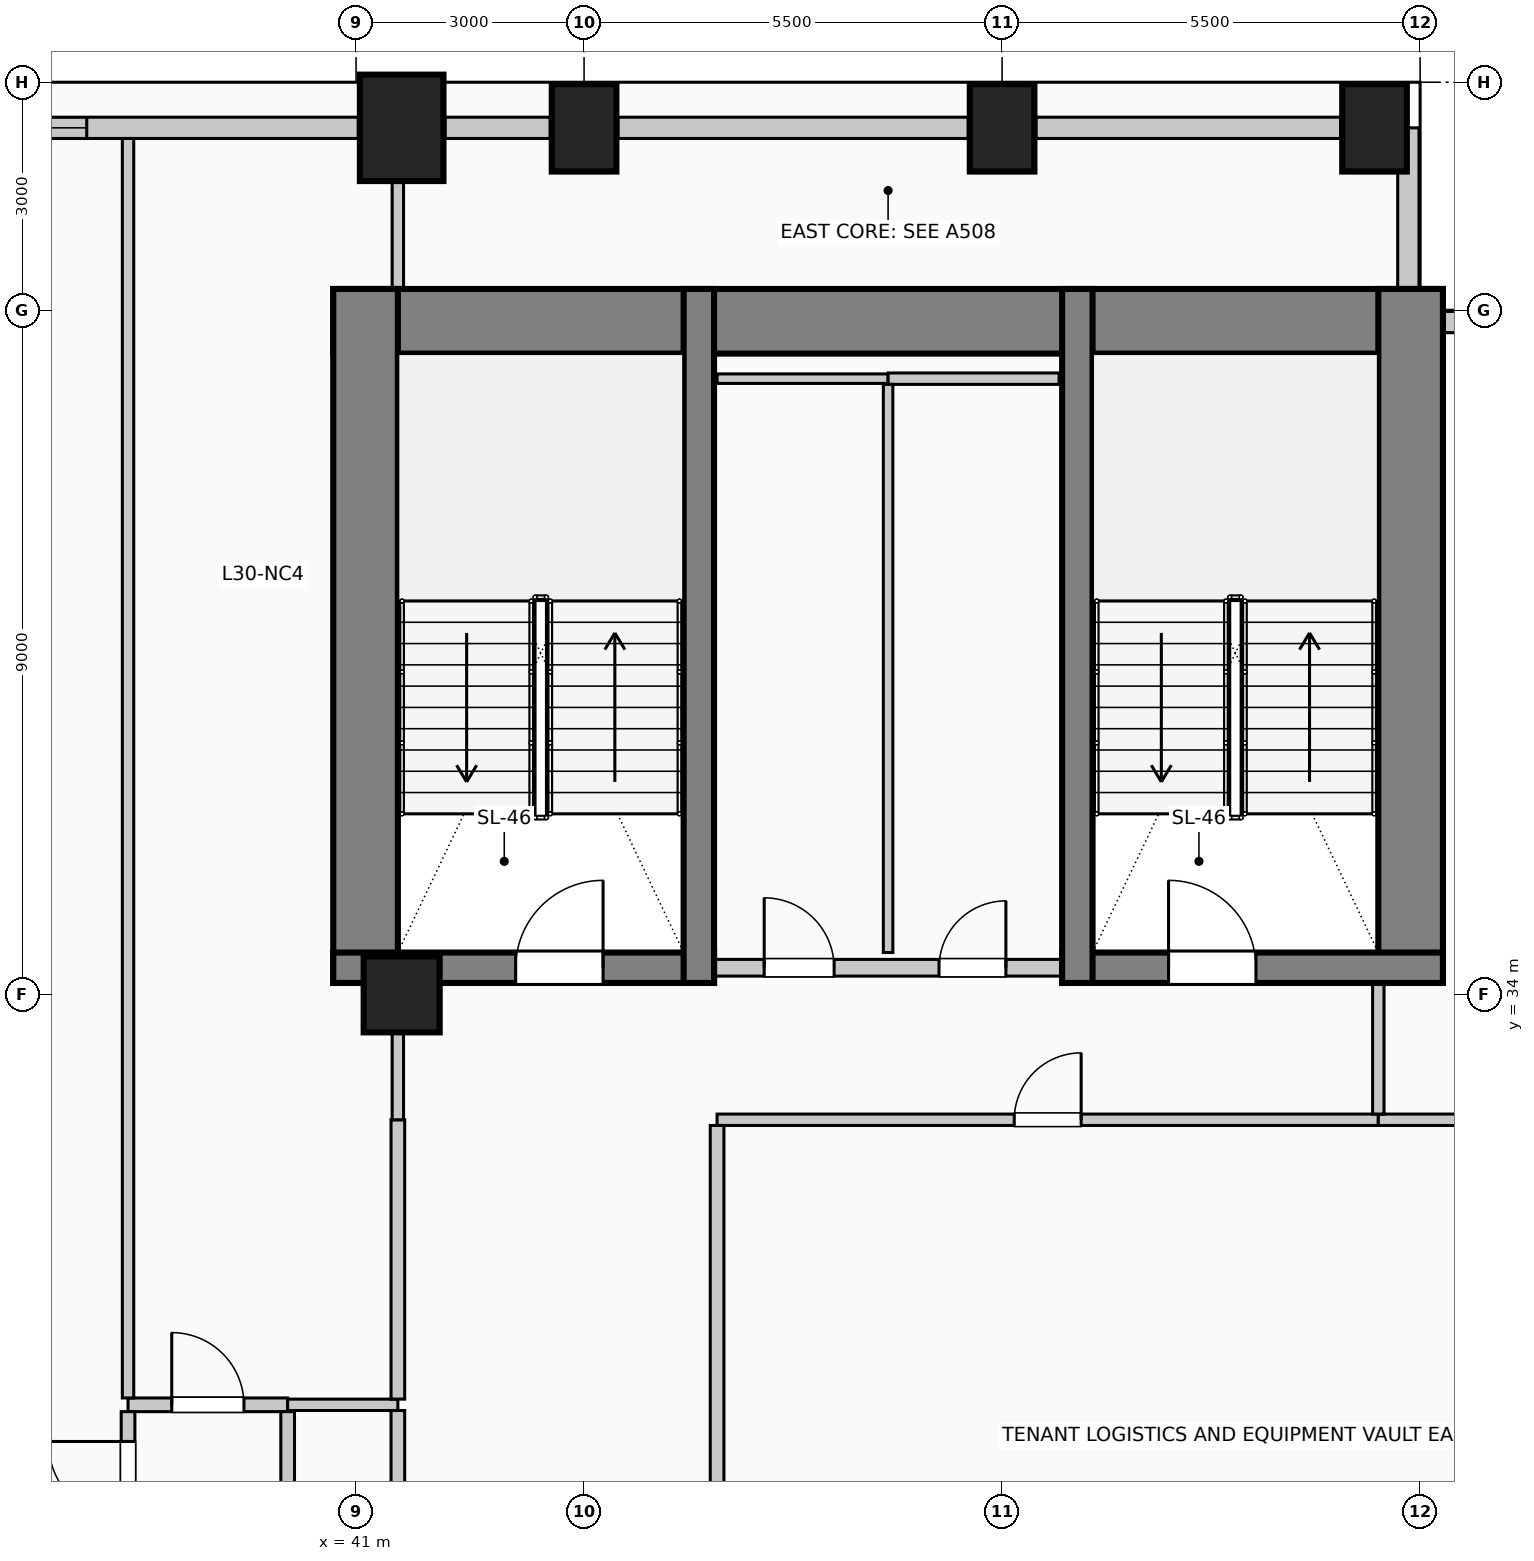
"""IFC4 building model, lengths in metres.
Left out: names, types, materials, properties, quantities, classifications, styles, units other than length and angle.
Written with IfcOpenShell. Run it as: python <this file> out.ifc"""

import sys

from ifc_helpers import new_model, si_unit, direction, frame, frame_2d, origin, origin_2d, place, context, subcontext, project, spatial, rectangle, circle, extrude, element, fill, save


model = new_model("IFC4")
c1 = context("Model", 3, precision=1e-05, world=origin(), true_north=direction((0.0, 1.0)))
c2 = subcontext(c1, "Body", "Model", "MODEL_VIEW")
j1 = project(units=[si_unit("LENGTHUNIT", "METRE"), si_unit("PLANEANGLEUNIT", "RADIAN")], contexts=[c1])
p1 = place(None, origin())
s1 = spatial("IfcSite", under=j1, at=p1, CompositionType="ELEMENT")
p2 = place(p1, origin())
s2 = spatial("IfcBuilding", under=s1, at=p2, CompositionType="ELEMENT")
p3 = place(p2, frame((0.0, 0.0, 124.6)))
s3 = spatial("IfcBuildingStorey", under=s2, at=p3, CompositionType="ELEMENT", Elevation=124.6)
p4 = place(p3, frame((40.7, 42.855, 0.0), z_axis=(0.0, 0.0, 1.0), x_axis=(1.0, 0.0, 0.0)))
e1 = element("IfcWall", 1, at=p4, inside=s3, PredefinedType="SHEAR", context=c2, shape_type="SweptSolid", body=[
    extrude(rectangle(XDim=14.6, YDim=0.85, at=frame_2d((7.3, 0.0))), origin(), (0.0, 0.0, 1.0), 4.0),
])
for number, where, z_axis, x_axis in (
    (2, (41.125, 34.15, 0.0), (0.0, 0.0, 1.0), (0.0, 1.0, 0.0)),
    (3, (54.875, 34.15, 0.0), (0.0, 0.0, 1.0), (0.0, 1.0, 0.0)),
):
    element("IfcWall", number, at=place(p3, frame(where, z_axis=z_axis, x_axis=x_axis)), inside=s3, PredefinedType="SHEAR", context=c2, shape_type="SweptSolid", body=[
        extrude(rectangle(XDim=9.13, YDim=0.85, at=frame_2d((4.565, 0.0))), origin(), (0.0, 0.0, 1.0), 4.0),
    ])
p5 = place(p3, frame((40.7, 34.35, 0.0), z_axis=(0.0, 0.0, 1.0), x_axis=(1.0, 0.0, 0.0)))
e4 = element("IfcWall", 4, at=p5, inside=s3, PredefinedType="SHEAR", context=c2, shape_type="SweptSolid", body=[
    extrude(rectangle(XDim=5.01, YDim=0.4, at=frame_2d((2.505, 0.0))), origin(), (0.0, 0.0, 1.0), 4.0),
])
p6 = place(p5, frame((2.4, 0.0, 0.0)))
e5 = element("IfcOpeningElement", 5, at=p6, cuts=e4, PredefinedType="OPENING", context=c2, shape_type="SweptSolid", body=[
    extrude(rectangle(XDim=1.15, YDim=2.2, at=frame_2d((0.575, 1.1))), frame((0.0, 0.21, 0.0), z_axis=(0.0, -1.0, 0.0), x_axis=(1.0, 0.0, 0.0)), (0.0, 0.0, 1.0), 0.42),
])
p7 = place(p3, frame((45.51, 34.15, 0.0), z_axis=(0.0, 0.0, 1.0), x_axis=(0.0, 1.0, 0.0)))
e6 = element("IfcWall", 6, at=p7, inside=s3, PredefinedType="SHEAR", context=c2, shape_type="SweptSolid", body=[
    extrude(rectangle(XDim=9.13, YDim=0.4, at=frame_2d((4.565, 0.0))), origin(), (0.0, 0.0, 1.0), 4.0),
])
p8 = place(p3, frame((50.29, 34.35, 0.0), z_axis=(0.0, 0.0, 1.0), x_axis=(1.0, 0.0, 0.0)))
e7 = element("IfcWall", 7, at=p8, inside=s3, PredefinedType="SHEAR", context=c2, shape_type="SweptSolid", body=[
    extrude(rectangle(XDim=5.01, YDim=0.4, at=frame_2d((2.505, 0.0))), origin(), (0.0, 0.0, 1.0), 4.0),
])
p9 = place(p8, frame((1.4, 0.0, 0.0)))
e8 = element("IfcOpeningElement", 8, at=p9, cuts=e7, PredefinedType="OPENING", context=c2, shape_type="SweptSolid", body=[
    extrude(rectangle(XDim=1.15, YDim=2.2, at=frame_2d((0.575, 1.1))), frame((0.0, 0.21, 0.0), z_axis=(0.0, -1.0, 0.0), x_axis=(1.0, 0.0, 0.0)), (0.0, 0.0, 1.0), 0.42),
])
p10 = place(p3, frame((50.49, 34.15, 0.0), z_axis=(0.0, 0.0, 1.0), x_axis=(0.0, 1.0, 0.0)))
e9 = element("IfcWall", 9, at=p10, inside=s3, PredefinedType="SHEAR", context=c2, shape_type="SweptSolid", body=[
    extrude(rectangle(XDim=9.13, YDim=0.4, at=frame_2d((4.565, 0.0))), origin(), (0.0, 0.0, 1.0), 4.0),
])
p11 = place(p3, frame((41.6, 45.4, 0.0), z_axis=(0.0, 0.0, 1.0), x_axis=(1.0, 0.0, 0.0)))
e10 = element("IfcColumn", 10, at=p11, inside=s3, PredefinedType="COLUMN", context=c2, shape_type="SweptSolid", body=[
    extrude(rectangle(XDim=1.1, YDim=1.4, at=origin_2d()), origin(), (0.0, 0.0, 1.0), 4.0),
])
for number, where, z_axis, x_axis in (
    (11, (44.0, 45.4, 0.0), (0.0, 0.0, 1.0), (1.0, 0.0, 0.0)),
    (12, (49.5, 45.4, 0.0), (0.0, 0.0, 1.0), (1.0, 0.0, 0.0)),
    (13, (54.4, 45.4, 0.0), (0.0, 0.0, 1.0), (1.0, 0.0, 0.0)),
):
    element("IfcColumn", number, at=place(p3, frame(where, z_axis=z_axis, x_axis=x_axis)), inside=s3, PredefinedType="COLUMN", context=c2, shape_type="SweptSolid", body=[
        extrude(rectangle(XDim=0.85, YDim=1.15, at=origin_2d()), origin(), (0.0, 0.0, 1.0), 4.0),
    ])
p12 = place(p3, frame((41.6, 34.0, 0.0), z_axis=(0.0, 0.0, 1.0), x_axis=(1.0, 0.0, 0.0)))
e14 = element("IfcColumn", 14, at=p12, inside=s3, PredefinedType="COLUMN", context=c2, shape_type="SweptSolid", body=[
    extrude(circle(Radius=0.5, at=origin_2d()), origin(), (0.0, 0.0, 1.0), 4.0),
])
p13 = place(p3, frame((34.57, 45.4, 0.0), z_axis=(0.0, 0.0, 1.0), x_axis=(1.0, 0.0, 0.0)))
e15 = element("IfcWall", 15, at=p13, inside=s3, PredefinedType="SOLIDWALL", context=c2, shape_type="SweptSolid", body=[
    extrude(rectangle(XDim=6.46, YDim=0.28, at=frame_2d((3.23, 0.0))), origin(), (0.0, 0.0, 1.0), 2.875),
])
p14 = place(p13, frame((0.687, 0.0, 0.5)))
e16 = element("IfcOpeningElement", 16, at=p14, cuts=e15, PredefinedType="OPENING", context=c2, shape_type="SweptSolid", body=[
    extrude(rectangle(XDim=2.2, YDim=1.95, at=frame_2d((1.1, 0.975))), frame((0.0, 0.15, 0.0), z_axis=(0.0, -1.0, 0.0), x_axis=(1.0, 0.0, 0.0)), (0.0, 0.0, 1.0), 0.3),
])
p15 = place(p3, frame((42.17, 45.4, 0.0), z_axis=(0.0, 0.0, 1.0), x_axis=(1.0, 0.0, 0.0)))
e17 = element("IfcWall", 17, at=p15, inside=s3, PredefinedType="SOLIDWALL", context=c2, shape_type="SweptSolid", body=[
    extrude(rectangle(XDim=1.385, YDim=0.28, at=frame_2d((0.692, 0.0))), origin(), (0.0, 0.0, 1.0), 2.875),
])
p16 = place(p3, frame((44.445, 45.4, 0.0), z_axis=(0.0, 0.0, 1.0), x_axis=(1.0, 0.0, 0.0)))
e18 = element("IfcWall", 18, at=p16, inside=s3, PredefinedType="SOLIDWALL", context=c2, shape_type="SweptSolid", body=[
    extrude(rectangle(XDim=4.61, YDim=0.28, at=frame_2d((2.305, 0.0))), origin(), (0.0, 0.0, 1.0), 2.875),
])
p17 = place(p3, frame((49.945, 45.4, 0.0), z_axis=(0.0, 0.0, 1.0), x_axis=(1.0, 0.0, 0.0)))
e19 = element("IfcWall", 19, at=p17, inside=s3, PredefinedType="SOLIDWALL", context=c2, shape_type="SweptSolid", body=[
    extrude(rectangle(XDim=4.01, YDim=0.28, at=frame_2d((2.005, 0.0))), origin(), (0.0, 0.0, 1.0), 2.875),
])
p18 = place(p3, frame((54.845, 45.4, 0.0), z_axis=(0.0, 0.0, 1.0), x_axis=(0.0, -1.0, 0.0)))
e20 = element("IfcWall", 20, at=p18, inside=s3, PredefinedType="SOLIDWALL", context=c2, shape_type="SweptSolid", body=[
    extrude(rectangle(XDim=2.115, YDim=0.28, at=frame_2d((1.058, 0.0))), origin(), (0.0, 0.0, 1.0), 3.725),
])
p19 = place(p3, frame((55.305, 42.845, 0.0), z_axis=(0.0, 0.0, 1.0), x_axis=(1.0, 0.0, 0.0)))
e21 = element("IfcWall", 21, at=p19, inside=s3, PredefinedType="SOLIDWALL", context=c2, shape_type="SweptSolid", body=[
    extrude(rectangle(XDim=2.095, YDim=0.28, at=frame_2d((1.047, 0.0))), origin(), (0.0, 0.0, 1.0), 3.725),
])
p20 = place(p3, frame((45.72, 34.35, 0.0), z_axis=(0.0, 0.0, 1.0), x_axis=(1.0, 0.0, 0.0)))
e22 = element("IfcWall", 22, at=p20, inside=s3, PredefinedType="PARTITIONING", context=c2, shape_type="SweptSolid", body=[
    extrude(rectangle(XDim=4.56, YDim=0.22, at=frame_2d((2.28, 0.0))), origin(), (0.0, 0.0, 1.0), 3.725),
])
p21 = place(p20, frame((0.65, 0.0, 0.0)))
e23 = element("IfcOpeningElement", 23, at=p21, cuts=e22, PredefinedType="OPENING", context=c2, shape_type="SweptSolid", body=[
    extrude(rectangle(XDim=0.92, YDim=2.1, at=frame_2d((0.46, 1.05))), frame((0.0, 0.12, 0.0), z_axis=(0.0, -1.0, 0.0), x_axis=(1.0, 0.0, 0.0)), (0.0, 0.0, 1.0), 0.24),
])
p22 = place(p20, frame((2.95, 0.0, 0.0)))
e24 = element("IfcOpeningElement", 24, at=p22, cuts=e22, PredefinedType="OPENING", context=c2, shape_type="SweptSolid", body=[
    extrude(rectangle(XDim=0.88, YDim=2.1, at=frame_2d((0.44, 1.05))), frame((0.0, 0.12, 0.0), z_axis=(0.0, -1.0, 0.0), x_axis=(1.0, 0.0, 0.0)), (0.0, 0.0, 1.0), 0.24),
])
p23 = place(p3, frame((38.0, 28.6, 0.0), z_axis=(0.0, 0.0, 1.0), x_axis=(1.0, 0.0, 0.0)))
e25 = element("IfcWall", 25, at=p23, inside=s3, PredefinedType="PARTITIONING", context=c2, shape_type="SweptSolid", body=[
    extrude(rectangle(XDim=2.1, YDim=0.18, at=frame_2d((1.05, 0.0))), origin(), (0.0, 0.0, 1.0), 3.725),
])
p24 = place(p23, frame((0.575, 0.0, 0.0)))
e26 = element("IfcOpeningElement", 26, at=p24, cuts=e25, PredefinedType="OPENING", context=c2, shape_type="SweptSolid", body=[
    extrude(rectangle(XDim=0.95, YDim=2.15, at=frame_2d((0.475, 1.075))), frame((0.0, 0.1, 0.0), z_axis=(0.0, -1.0, 0.0), x_axis=(1.0, 0.0, 0.0)), (0.0, 0.0, 1.0), 0.2),
])
p25 = place(p3, frame((40.1, 28.6, 0.0), z_axis=(0.0, 0.0, 1.0), x_axis=(1.0, 0.0, 0.0)))
e27 = element("IfcWall", 27, at=p25, inside=s3, PredefinedType="PARTITIONING", context=c2, shape_type="SweptSolid", body=[
    extrude(rectangle(XDim=1.45, YDim=0.15, at=frame_2d((0.725, 0.0))), origin(), (0.0, 0.0, 1.0), 3.725),
])
p26 = place(p3, frame((45.75, 32.35, 0.0), z_axis=(0.0, 0.0, 1.0), x_axis=(1.0, 0.0, 0.0)))
e28 = element("IfcWall", 28, at=p26, inside=s3, PredefinedType="PARTITIONING", context=c2, shape_type="SweptSolid", body=[
    extrude(rectangle(XDim=8.7, YDim=0.15, at=frame_2d((4.35, 0.0))), origin(), (0.0, 0.0, 1.0), 3.725),
])
p27 = place(p26, frame((3.91, 0.0, 0.0)))
e29 = element("IfcOpeningElement", 29, at=p27, cuts=e28, PredefinedType="OPENING", context=c2, shape_type="SweptSolid", body=[
    extrude(rectangle(XDim=0.88, YDim=2.1, at=frame_2d((0.44, 1.05))), frame((0.0, 0.085, 0.0), z_axis=(0.0, -1.0, 0.0), x_axis=(1.0, 0.0, 0.0)), (0.0, 0.0, 1.0), 0.17),
])
p28 = place(p3, frame((54.45, 32.35, 0.0), z_axis=(0.0, 0.0, 1.0), x_axis=(1.0, 0.0, 0.0)))
e30 = element("IfcWall", 30, at=p28, inside=s3, PredefinedType="PARTITIONING", context=c2, shape_type="SweptSolid", body=[
    extrude(rectangle(XDim=2.81, YDim=0.15, at=frame_2d((1.405, 0.0))), origin(), (0.0, 0.0, 1.0), 3.725),
])
p29 = place(p3, frame((45.75, 42.1, 0.0), z_axis=(0.0, 0.0, 1.0), x_axis=(1.0, 0.0, 0.0)))
e31 = element("IfcWall", 31, at=p29, inside=s3, PredefinedType="PARTITIONING", context=c2, shape_type="SweptSolid", body=[
    extrude(rectangle(XDim=2.25, YDim=0.125, at=frame_2d((1.125, 0.0))), origin(), (0.0, 0.0, 1.0), 3.725),
])
p30 = place(p3, frame((48.0, 42.1, 0.0), z_axis=(0.0, 0.0, 1.0), x_axis=(1.0, 0.0, 0.0)))
e32 = element("IfcWall", 32, at=p30, inside=s3, PredefinedType="PARTITIONING", context=c2, shape_type="SweptSolid", body=[
    extrude(rectangle(XDim=2.25, YDim=0.15, at=frame_2d((1.125, 0.0))), origin(), (0.0, 0.0, 1.0), 3.725),
])
p31 = place(p3, frame((38.0, 26.675, 0.0), z_axis=(0.0, 0.0, 1.0), x_axis=(0.0, 1.0, 0.0)))
e33 = element("IfcWall", 33, at=p31, inside=s3, PredefinedType="PARTITIONING", context=c2, shape_type="SweptSolid", body=[
    extrude(rectangle(XDim=1.835, YDim=0.18, at=frame_2d((0.917, 0.0))), origin(), (0.0, 0.0, 1.0), 3.725),
])
p32 = place(p31, frame((0.393, 0.0, 0.0)))
e34 = element("IfcOpeningElement", 34, at=p32, cuts=e33, PredefinedType="OPENING", context=c2, shape_type="SweptSolid", body=[
    extrude(rectangle(XDim=1.05, YDim=2.15, at=frame_2d((0.525, 1.075))), frame((0.0, 0.1, 0.0), z_axis=(0.0, -1.0, 0.0), x_axis=(1.0, 0.0, 0.0)), (0.0, 0.0, 1.0), 0.2),
])
p33 = place(p3, frame((38.0, 28.69, 0.0), z_axis=(0.0, 0.0, 1.0), x_axis=(0.0, 1.0, 0.0)))
e35 = element("IfcWall", 35, at=p33, inside=s3, PredefinedType="PARTITIONING", context=c2, shape_type="SweptSolid", body=[
    extrude(rectangle(XDim=16.57, YDim=0.15, at=frame_2d((8.285, 0.0))), origin(), (0.0, 0.0, 1.0), 3.725),
])
p34 = place(p3, frame((40.1, 15.74, 0.0), z_axis=(0.0, 0.0, 1.0), x_axis=(0.0, 1.0, 0.0)))
e36 = element("IfcWall", 36, at=p34, inside=s3, PredefinedType="PARTITIONING", context=c2, shape_type="SweptSolid", body=[
    extrude(rectangle(XDim=12.77, YDim=0.18, at=frame_2d((6.385, 0.0))), origin(), (0.0, 0.0, 1.0), 3.725),
])
p35 = place(p3, frame((41.55, 18.5, 0.0), z_axis=(0.0, 0.0, 1.0), x_axis=(0.0, 1.0, 0.0)))
e37 = element("IfcWall", 37, at=p35, inside=s3, PredefinedType="PARTITIONING", context=c2, shape_type="SweptSolid", body=[
    extrude(rectangle(XDim=10.025, YDim=0.18, at=frame_2d((5.012, 0.0))), origin(), (0.0, 0.0, 1.0), 3.07),
])
p36 = place(p3, frame((41.55, 28.675, 0.0), z_axis=(0.0, 0.0, 1.0), x_axis=(0.0, 1.0, 0.0)))
e38 = element("IfcWall", 38, at=p36, inside=s3, PredefinedType="PARTITIONING", context=c2, shape_type="SweptSolid", body=[
    extrude(rectangle(XDim=3.675, YDim=0.18, at=frame_2d((1.837, 0.0))), origin(), (0.0, 0.0, 1.0), 3.07),
])
p37 = place(p3, frame((41.55, 32.35, 0.0), z_axis=(0.0, 0.0, 1.0), x_axis=(0.0, 1.0, 0.0)))
e39 = element("IfcWall", 39, at=p37, inside=s3, PredefinedType="PARTITIONING", context=c2, shape_type="SweptSolid", body=[
    extrude(rectangle(XDim=1.15, YDim=0.15, at=frame_2d((0.575, 0.0))), origin(), (0.0, 0.0, 1.0), 3.07),
])
p38 = place(p3, frame((41.55, 43.28, 0.0), z_axis=(0.0, 0.0, 1.0), x_axis=(0.0, 1.0, 0.0)))
e40 = element("IfcWall", 40, at=p38, inside=s3, PredefinedType="PARTITIONING", context=c2, shape_type="SweptSolid", body=[
    extrude(rectangle(XDim=1.42, YDim=0.15, at=frame_2d((0.71, 0.0))), origin(), (0.0, 0.0, 1.0), 3.725),
])
p39 = place(p3, frame((45.75, 24.075, 0.0), z_axis=(0.0, 0.0, 1.0), x_axis=(0.0, 1.0, 0.0)))
e41 = element("IfcWall", 41, at=p39, inside=s3, PredefinedType="PARTITIONING", context=c2, shape_type="SweptSolid", body=[
    extrude(rectangle(XDim=8.2, YDim=0.18, at=frame_2d((4.1, 0.0))), origin(), (0.0, 0.0, 1.0), 3.725),
])
p40 = place(p3, frame((48.0, 34.55, 0.0), z_axis=(0.0, 0.0, 1.0), x_axis=(0.0, 1.0, 0.0)))
e42 = element("IfcWall", 42, at=p40, inside=s3, PredefinedType="PARTITIONING", context=c2, shape_type="SweptSolid", body=[
    extrude(rectangle(XDim=7.475, YDim=0.125, at=frame_2d((3.737, 0.0))), origin(), (0.0, 0.0, 1.0), 3.725),
])
p41 = place(p3, frame((54.45, 32.425, 0.0), z_axis=(0.0, 0.0, 1.0), x_axis=(0.0, 1.0, 0.0)))
e43 = element("IfcWall", 43, at=p41, inside=s3, PredefinedType="PARTITIONING", context=c2, shape_type="SweptSolid", body=[
    extrude(rectangle(XDim=1.725, YDim=0.15, at=frame_2d((0.862, 0.0))), origin(), (0.0, 0.0, 1.0), 3.725),
])
p42 = place(p14, origin())
e44 = element("IfcWindow", 44, at=p42, inside=s3, PartitioningType="SINGLE_PANEL", PredefinedType="WINDOW", context=c2, shape_type="SweptSolid", body=[
    extrude(rectangle(XDim=2.2, YDim=1.95, at=frame_2d((1.1, 0.975))), frame((0.0, 0.03, 0.0), z_axis=(0.0, -1.0, 0.0), x_axis=(1.0, 0.0, 0.0)), (0.0, 0.0, 1.0), 0.06),
])
fill(e16, e44)
p43 = place(p6, origin())
e45 = element("IfcDoor", 45, at=p43, inside=s3, OperationType="SINGLE_SWING_RIGHT", PredefinedType="DOOR", context=c2, shape_type="SweptSolid", body=[
    extrude(rectangle(XDim=1.15, YDim=2.2, at=frame_2d((0.575, 1.1))), frame((0.0, 0.025, 0.0), z_axis=(0.0, -1.0, 0.0), x_axis=(1.0, 0.0, 0.0)), (0.0, 0.0, 1.0), 0.05),
])
fill(e5, e45)
p44 = place(p21, origin())
e46 = element("IfcDoor", 46, at=p44, inside=s3, OperationType="SINGLE_SWING_LEFT", PredefinedType="DOOR", context=c2, shape_type="SweptSolid", body=[
    extrude(rectangle(XDim=0.92, YDim=2.1, at=frame_2d((0.46, 1.05))), frame((0.0, 0.025, 0.0), z_axis=(0.0, -1.0, 0.0), x_axis=(1.0, 0.0, 0.0)), (0.0, 0.0, 1.0), 0.05),
])
fill(e23, e46)
p45 = place(p22, origin())
e47 = element("IfcDoor", 47, at=p45, inside=s3, OperationType="SINGLE_SWING_RIGHT", PredefinedType="DOOR", context=c2, shape_type="SweptSolid", body=[
    extrude(rectangle(XDim=0.88, YDim=2.1, at=frame_2d((0.44, 1.05))), frame((0.0, 0.025, 0.0), z_axis=(0.0, -1.0, 0.0), x_axis=(1.0, 0.0, 0.0)), (0.0, 0.0, 1.0), 0.05),
])
fill(e24, e47)
p46 = place(p9, origin())
e48 = element("IfcDoor", 48, at=p46, inside=s3, OperationType="SINGLE_SWING_LEFT", PredefinedType="DOOR", context=c2, shape_type="SweptSolid", body=[
    extrude(rectangle(XDim=1.15, YDim=2.2, at=frame_2d((0.575, 1.1))), frame((0.0, 0.025, 0.0), z_axis=(0.0, -1.0, 0.0), x_axis=(1.0, 0.0, 0.0)), (0.0, 0.0, 1.0), 0.05),
])
fill(e8, e48)
p47 = place(p24, origin())
e49 = element("IfcDoor", 49, at=p47, inside=s3, OperationType="SINGLE_SWING_LEFT", PredefinedType="DOOR", context=c2, shape_type="SweptSolid", body=[
    extrude(rectangle(XDim=0.95, YDim=2.15, at=frame_2d((0.475, 1.075))), frame((0.0, 0.025, 0.0), z_axis=(0.0, -1.0, 0.0), x_axis=(1.0, 0.0, 0.0)), (0.0, 0.0, 1.0), 0.05),
])
fill(e26, e49)
p48 = place(p27, origin())
e50 = element("IfcDoor", 50, at=p48, inside=s3, OperationType="SINGLE_SWING_RIGHT", PredefinedType="DOOR", context=c2, shape_type="SweptSolid", body=[
    extrude(rectangle(XDim=0.88, YDim=2.1, at=frame_2d((0.44, 1.05))), frame((0.0, 0.025, 0.0), z_axis=(0.0, -1.0, 0.0), x_axis=(1.0, 0.0, 0.0)), (0.0, 0.0, 1.0), 0.05),
])
fill(e29, e50)
p49 = place(p32, origin())
e51 = element("IfcDoor", 51, at=p49, inside=s3, OperationType="SINGLE_SWING_RIGHT", PredefinedType="DOOR", context=c2, shape_type="SweptSolid", body=[
    extrude(rectangle(XDim=1.05, YDim=2.15, at=frame_2d((0.525, 1.075))), frame((0.0, 0.025, 0.0), z_axis=(0.0, -1.0, 0.0), x_axis=(1.0, 0.0, 0.0)), (0.0, 0.0, 1.0), 0.05),
])
fill(e34, e51)
save(model, sys.argv[1])
